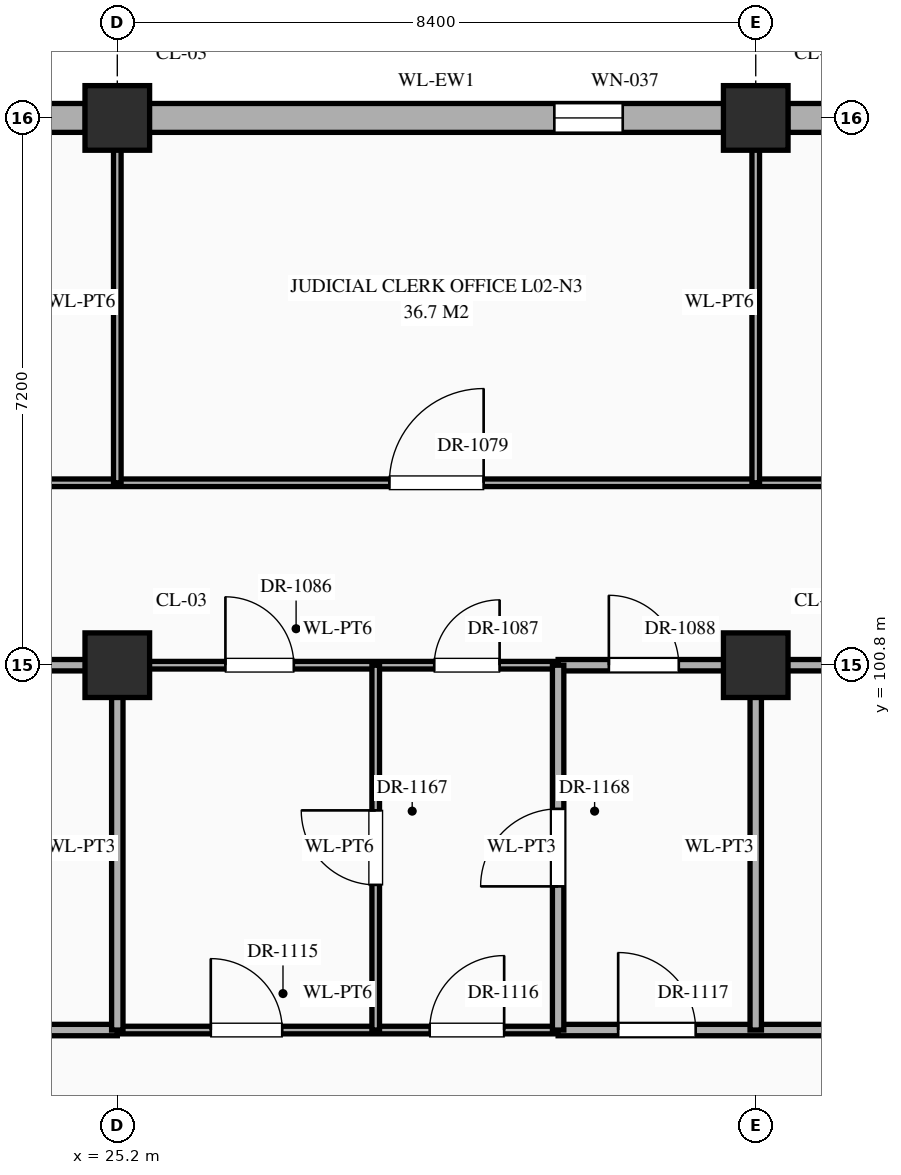
"""IFC4 building model, lengths in metres.
Left out: names, types, materials, properties, quantities, classifications, styles, units other than length and angle.
Written with IfcOpenShell. Run it as: python <this file> out.ifc"""

import sys

from ifc_helpers import new_model, si_unit, direction, frame, frame_2d, origin, origin_2d, place, context, subcontext, project, spatial, rectangle, extrude, element, fill, save


model = new_model("IFC4")
c1 = context("Model", 3, precision=1e-05, world=origin(), true_north=direction((0.0, 1.0)))
c2 = subcontext(c1, "Body", "Model", "MODEL_VIEW")
j1 = project(units=[si_unit("LENGTHUNIT", "METRE"), si_unit("PLANEANGLEUNIT", "RADIAN")], contexts=[c1])
p1 = place(None, origin())
s1 = spatial("IfcSite", under=j1, at=p1, CompositionType="ELEMENT")
p2 = place(p1, origin())
s2 = spatial("IfcBuilding", under=s1, at=p2, CompositionType="ELEMENT")
p3 = place(p2, frame((0.0, 0.0, 5.4)))
s3 = spatial("IfcBuildingStorey", under=s2, at=p3, CompositionType="ELEMENT", Elevation=5.4)
for number, where, z_axis, x_axis in (
    (1, (25.2, 100.8, 0.0), (0.0, 0.0, 1.0), (1.0, 0.0, 0.0)),
    (2, (25.2, 108.0, 0.0), (0.0, 0.0, 1.0), (1.0, 0.0, 0.0)),
    (3, (33.6, 100.8, 0.0), (0.0, 0.0, 1.0), (1.0, 0.0, 0.0)),
    (4, (33.6, 108.0, 0.0), (0.0, 0.0, 1.0), (1.0, 0.0, 0.0)),
):
    element("IfcColumn", number, at=place(p3, frame(where, z_axis=z_axis, x_axis=x_axis)), inside=s3, PredefinedType="COLUMN", context=c2, shape_type="SweptSolid", body=[
        extrude(rectangle(XDim=0.85, YDim=0.85, at=origin_2d()), origin(), (0.0, 0.0, 1.0), 5.4),
    ])
p4 = place(p3, frame((17.22, 108.0, 0.0), z_axis=(0.0, 0.0, 1.0), x_axis=(1.0, 0.0, 0.0)))
e5 = element("IfcWall", 5, at=p4, inside=s3, PredefinedType="STANDARD", context=c2, shape_type="SweptSolid", body=[
    extrude(rectangle(XDim=7.56, YDim=0.38, at=frame_2d((3.78, 0.0))), origin(), (0.0, 0.0, 1.0), 4.47),
])
p5 = place(p4, frame((5.33, 0.0, 0.85)))
e6 = element("IfcOpeningElement", 6, at=p5, cuts=e5, PredefinedType="OPENING", context=c2, shape_type="SweptSolid", body=[
    extrude(rectangle(XDim=0.9, YDim=1.2, at=frame_2d((0.45, 0.6))), frame((0.0, 0.202, 0.0), z_axis=(0.0, -1.0, 0.0), x_axis=(1.0, 0.0, 0.0)), (0.0, 0.0, 1.0), 0.404),
])
p6 = place(p3, frame((25.62, 108.0, 0.0), z_axis=(0.0, 0.0, 1.0), x_axis=(1.0, 0.0, 0.0)))
e7 = element("IfcWall", 7, at=p6, inside=s3, PredefinedType="STANDARD", context=c2, shape_type="SweptSolid", body=[
    extrude(rectangle(XDim=7.56, YDim=0.38, at=frame_2d((3.78, 0.0))), origin(), (0.0, 0.0, 1.0), 4.47),
])
p7 = place(p6, frame((5.33, 0.0, 0.85)))
e8 = element("IfcOpeningElement", 8, at=p7, cuts=e7, PredefinedType="OPENING", context=c2, shape_type="SweptSolid", body=[
    extrude(rectangle(XDim=0.9, YDim=1.38, at=frame_2d((0.45, 0.69))), frame((0.0, 0.202, 0.0), z_axis=(0.0, -1.0, 0.0), x_axis=(1.0, 0.0, 0.0)), (0.0, 0.0, 1.0), 0.404),
])
p8 = place(p3, frame((34.02, 108.0, 0.0), z_axis=(0.0, 0.0, 1.0), x_axis=(1.0, 0.0, 0.0)))
e9 = element("IfcWall", 9, at=p8, inside=s3, PredefinedType="STANDARD", context=c2, shape_type="SweptSolid", body=[
    extrude(rectangle(XDim=7.56, YDim=0.38, at=frame_2d((3.78, 0.0))), origin(), (0.0, 0.0, 1.0), 4.47),
])
p9 = place(p8, frame((5.33, 0.0, 0.85)))
e10 = element("IfcOpeningElement", 10, at=p9, cuts=e9, PredefinedType="OPENING", context=c2, shape_type="SweptSolid", body=[
    extrude(rectangle(XDim=0.9, YDim=1.56, at=frame_2d((0.45, 0.78))), frame((0.0, 0.202, 0.0), z_axis=(0.0, -1.0, 0.0), x_axis=(1.0, 0.0, 0.0)), (0.0, 0.0, 1.0), 0.404),
])
p10 = place(p3, frame((5.8, 96.0, 0.0), z_axis=(0.0, 0.0, 1.0), x_axis=(1.0, 0.0, 0.0)))
e11 = element("IfcWall", 11, at=p10, inside=s3, PredefinedType="STANDARD", context=c2, shape_type="SweptSolid", body=[
    extrude(rectangle(XDim=19.4, YDim=0.15, at=frame_2d((9.7, 0.0))), origin(), (0.0, 0.0, 1.0), 5.12),
])
p11 = place(p10, frame((0.7, 0.0, 0.0)))
e12 = element("IfcOpeningElement", 12, at=p11, cuts=e11, PredefinedType="OPENING", context=c2, shape_type="SweptSolid", body=[
    extrude(rectangle(XDim=1.2, YDim=2.35, at=frame_2d((0.6, 1.175))), frame((0.0, 0.087, 0.0), z_axis=(0.0, -1.0, 0.0), x_axis=(1.0, 0.0, 0.0)), (0.0, 0.0, 1.0), 0.174),
])
p12 = place(p10, frame((6.18, 0.0, 0.0)))
e13 = element("IfcOpeningElement", 13, at=p12, cuts=e11, PredefinedType="OPENING", context=c2, shape_type="SweptSolid", body=[
    extrude(rectangle(XDim=1.24, YDim=2.3, at=frame_2d((0.62, 1.15))), frame((0.0, 0.087, 0.0), z_axis=(0.0, -1.0, 0.0), x_axis=(1.0, 0.0, 0.0)), (0.0, 0.0, 1.0), 0.174),
])
p13 = place(p10, frame((14.56, 0.0, 0.0)))
e14 = element("IfcOpeningElement", 14, at=p13, cuts=e11, PredefinedType="OPENING", context=c2, shape_type="SweptSolid", body=[
    extrude(rectangle(XDim=1.28, YDim=2.35, at=frame_2d((0.64, 1.175))), frame((0.0, 0.087, 0.0), z_axis=(0.0, -1.0, 0.0), x_axis=(1.0, 0.0, 0.0)), (0.0, 0.0, 1.0), 0.174),
])
p14 = place(p3, frame((25.2, 96.0, 0.0), z_axis=(0.0, 0.0, 1.0), x_axis=(1.0, 0.0, 0.0)))
e15 = element("IfcWall", 15, at=p14, inside=s3, PredefinedType="STANDARD", context=c2, shape_type="SweptSolid", body=[
    extrude(rectangle(XDim=5.8, YDim=0.1, at=frame_2d((2.9, 0.0))), origin(), (0.0, 0.0, 1.0), 5.12),
])
p15 = place(p14, frame((1.23, 0.0, 0.0)))
e16 = element("IfcOpeningElement", 16, at=p15, cuts=e15, PredefinedType="OPENING", context=c2, shape_type="SweptSolid", body=[
    extrude(rectangle(XDim=0.94, YDim=2.3, at=frame_2d((0.47, 1.15))), frame((0.0, 0.062, 0.0), z_axis=(0.0, -1.0, 0.0), x_axis=(1.0, 0.0, 0.0)), (0.0, 0.0, 1.0), 0.124),
])
p16 = place(p14, frame((4.11, 0.0, 0.0)))
e17 = element("IfcOpeningElement", 17, at=p16, cuts=e15, PredefinedType="OPENING", context=c2, shape_type="SweptSolid", body=[
    extrude(rectangle(XDim=0.98, YDim=2.35, at=frame_2d((0.49, 1.175))), frame((0.0, 0.062, 0.0), z_axis=(0.0, -1.0, 0.0), x_axis=(1.0, 0.0, 0.0)), (0.0, 0.0, 1.0), 0.124),
])
p17 = place(p3, frame((31.0, 96.0, 0.0), z_axis=(0.0, 0.0, 1.0), x_axis=(1.0, 0.0, 0.0)))
e18 = element("IfcWall", 18, at=p17, inside=s3, PredefinedType="STANDARD", context=c2, shape_type="SweptSolid", body=[
    extrude(rectangle(XDim=19.4, YDim=0.15, at=frame_2d((9.7, 0.0))), origin(), (0.0, 0.0, 1.0), 5.12),
])
p18 = place(p17, frame((0.79, 0.0, 0.0)))
e19 = element("IfcOpeningElement", 19, at=p18, cuts=e18, PredefinedType="OPENING", context=c2, shape_type="SweptSolid", body=[
    extrude(rectangle(XDim=1.02, YDim=2.4, at=frame_2d((0.51, 1.2))), frame((0.0, 0.087, 0.0), z_axis=(0.0, -1.0, 0.0), x_axis=(1.0, 0.0, 0.0)), (0.0, 0.0, 1.0), 0.174),
])
p19 = place(p17, frame((6.27, 0.0, 0.0)))
e20 = element("IfcOpeningElement", 20, at=p19, cuts=e18, PredefinedType="OPENING", context=c2, shape_type="SweptSolid", body=[
    extrude(rectangle(XDim=1.06, YDim=2.4, at=frame_2d((0.53, 1.2))), frame((0.0, 0.087, 0.0), z_axis=(0.0, -1.0, 0.0), x_axis=(1.0, 0.0, 0.0)), (0.0, 0.0, 1.0), 0.174),
])
p20 = place(p17, frame((14.63, 0.0, 0.0)))
e21 = element("IfcOpeningElement", 21, at=p20, cuts=e18, PredefinedType="OPENING", context=c2, shape_type="SweptSolid", body=[
    extrude(rectangle(XDim=1.14, YDim=2.4, at=frame_2d((0.57, 1.2))), frame((0.0, 0.087, 0.0), z_axis=(0.0, -1.0, 0.0), x_axis=(1.0, 0.0, 0.0)), (0.0, 0.0, 1.0), 0.174),
])
p21 = place(p3, frame((5.8, 100.8, 0.0), z_axis=(0.0, 0.0, 1.0), x_axis=(1.0, 0.0, 0.0)))
e22 = element("IfcWall", 22, at=p21, inside=s3, PredefinedType="STANDARD", context=c2, shape_type="SweptSolid", body=[
    extrude(rectangle(XDim=19.4, YDim=0.15, at=frame_2d((9.7, 0.0))), origin(), (0.0, 0.0, 1.0), 4.27),
])
p22 = place(p21, frame((0.617, 0.0, 0.0)))
e23 = element("IfcOpeningElement", 23, at=p22, cuts=e22, PredefinedType="OPENING", context=c2, shape_type="SweptSolid", body=[
    extrude(rectangle(XDim=1.02, YDim=2.4, at=frame_2d((0.51, 1.2))), frame((0.0, 0.087, 0.0), z_axis=(0.0, -1.0, 0.0), x_axis=(1.0, 0.0, 0.0)), (0.0, 0.0, 1.0), 0.174),
])
p23 = place(p21, frame((6.27, 0.0, 0.0)))
e24 = element("IfcOpeningElement", 24, at=p23, cuts=e22, PredefinedType="OPENING", context=c2, shape_type="SweptSolid", body=[
    extrude(rectangle(XDim=1.06, YDim=2.4, at=frame_2d((0.53, 1.2))), frame((0.0, 0.087, 0.0), z_axis=(0.0, -1.0, 0.0), x_axis=(1.0, 0.0, 0.0)), (0.0, 0.0, 1.0), 0.174),
])
p24 = place(p21, frame((14.63, 0.0, 0.0)))
e25 = element("IfcOpeningElement", 25, at=p24, cuts=e22, PredefinedType="OPENING", context=c2, shape_type="SweptSolid", body=[
    extrude(rectangle(XDim=1.14, YDim=2.4, at=frame_2d((0.57, 1.2))), frame((0.0, 0.087, 0.0), z_axis=(0.0, -1.0, 0.0), x_axis=(1.0, 0.0, 0.0)), (0.0, 0.0, 1.0), 0.174),
])
p25 = place(p3, frame((25.2, 100.8, 0.0), z_axis=(0.0, 0.0, 1.0), x_axis=(1.0, 0.0, 0.0)))
e26 = element("IfcWall", 26, at=p25, inside=s3, PredefinedType="STANDARD", context=c2, shape_type="SweptSolid", body=[
    extrude(rectangle(XDim=5.8, YDim=0.1, at=frame_2d((2.9, 0.0))), origin(), (0.0, 0.0, 1.0), 4.27),
])
p26 = place(p25, frame((1.423, 0.0, 0.0)))
e27 = element("IfcOpeningElement", 27, at=p26, cuts=e26, PredefinedType="OPENING", context=c2, shape_type="SweptSolid", body=[
    extrude(rectangle(XDim=0.9, YDim=2.15, at=frame_2d((0.45, 1.075))), frame((0.0, 0.062, 0.0), z_axis=(0.0, -1.0, 0.0), x_axis=(1.0, 0.0, 0.0)), (0.0, 0.0, 1.0), 0.124),
])
p27 = place(p25, frame((4.17, 0.0, 0.0)))
e28 = element("IfcOpeningElement", 28, at=p27, cuts=e26, PredefinedType="OPENING", context=c2, shape_type="SweptSolid", body=[
    extrude(rectangle(XDim=0.86, YDim=2.1, at=frame_2d((0.43, 1.05))), frame((0.0, 0.062, 0.0), z_axis=(0.0, -1.0, 0.0), x_axis=(1.0, 0.0, 0.0)), (0.0, 0.0, 1.0), 0.124),
])
p28 = place(p3, frame((31.0, 100.8, 0.0), z_axis=(0.0, 0.0, 1.0), x_axis=(1.0, 0.0, 0.0)))
e29 = element("IfcWall", 29, at=p28, inside=s3, PredefinedType="STANDARD", context=c2, shape_type="SweptSolid", body=[
    extrude(rectangle(XDim=11.0, YDim=0.15, at=frame_2d((5.5, 0.0))), origin(), (0.0, 0.0, 1.0), 4.27),
])
p29 = place(p28, frame((0.667, 0.0, 0.0)))
e30 = element("IfcOpeningElement", 30, at=p29, cuts=e29, PredefinedType="OPENING", context=c2, shape_type="SweptSolid", body=[
    extrude(rectangle(XDim=0.92, YDim=2.15, at=frame_2d((0.46, 1.075))), frame((0.0, 0.087, 0.0), z_axis=(0.0, -1.0, 0.0), x_axis=(1.0, 0.0, 0.0)), (0.0, 0.0, 1.0), 0.174),
])
p30 = place(p28, frame((6.32, 0.0, 0.0)))
e31 = element("IfcOpeningElement", 31, at=p30, cuts=e29, PredefinedType="OPENING", context=c2, shape_type="SweptSolid", body=[
    extrude(rectangle(XDim=0.96, YDim=2.2, at=frame_2d((0.48, 1.1))), frame((0.0, 0.087, 0.0), z_axis=(0.0, -1.0, 0.0), x_axis=(1.0, 0.0, 0.0)), (0.0, 0.0, 1.0), 0.174),
])
p31 = place(p3, frame((0.04, 103.2, 0.0), z_axis=(0.0, 0.0, 1.0), x_axis=(1.0, 0.0, 0.0)))
e32 = element("IfcWall", 32, at=p31, inside=s3, PredefinedType="STANDARD", context=c2, shape_type="SweptSolid", body=[
    extrude(rectangle(XDim=41.96, YDim=0.1, at=frame_2d((20.98, 0.0))), origin(), (0.0, 0.0, 1.0), 5.12),
])
p32 = place(p31, frame((3.62, 0.0, 0.0)))
e33 = element("IfcOpeningElement", 33, at=p32, cuts=e32, PredefinedType="OPENING", context=c2, shape_type="SweptSolid", body=[
    extrude(rectangle(XDim=1.12, YDim=2.25, at=frame_2d((0.56, 1.125))), frame((0.0, 0.062, 0.0), z_axis=(0.0, -1.0, 0.0), x_axis=(1.0, 0.0, 0.0)), (0.0, 0.0, 1.0), 0.124),
])
p33 = place(p31, frame((11.98, 0.0, 0.0)))
e34 = element("IfcOpeningElement", 34, at=p33, cuts=e32, PredefinedType="OPENING", context=c2, shape_type="SweptSolid", body=[
    extrude(rectangle(XDim=1.16, YDim=2.3, at=frame_2d((0.58, 1.15))), frame((0.0, 0.062, 0.0), z_axis=(0.0, -1.0, 0.0), x_axis=(1.0, 0.0, 0.0)), (0.0, 0.0, 1.0), 0.124),
])
p34 = place(p31, frame((20.36, 0.0, 0.0)))
e35 = element("IfcOpeningElement", 35, at=p34, cuts=e32, PredefinedType="OPENING", context=c2, shape_type="SweptSolid", body=[
    extrude(rectangle(XDim=1.2, YDim=2.35, at=frame_2d((0.6, 1.175))), frame((0.0, 0.062, 0.0), z_axis=(0.0, -1.0, 0.0), x_axis=(1.0, 0.0, 0.0)), (0.0, 0.0, 1.0), 0.124),
])
p35 = place(p31, frame((28.74, 0.0, 0.0)))
e36 = element("IfcOpeningElement", 36, at=p35, cuts=e32, PredefinedType="OPENING", context=c2, shape_type="SweptSolid", body=[
    extrude(rectangle(XDim=1.24, YDim=2.3, at=frame_2d((0.62, 1.15))), frame((0.0, 0.062, 0.0), z_axis=(0.0, -1.0, 0.0), x_axis=(1.0, 0.0, 0.0)), (0.0, 0.0, 1.0), 0.124),
])
p36 = place(p31, frame((37.12, 0.0, 0.0)))
e37 = element("IfcOpeningElement", 37, at=p36, cuts=e32, PredefinedType="OPENING", context=c2, shape_type="SweptSolid", body=[
    extrude(rectangle(XDim=1.28, YDim=2.35, at=frame_2d((0.64, 1.175))), frame((0.0, 0.062, 0.0), z_axis=(0.0, -1.0, 0.0), x_axis=(1.0, 0.0, 0.0)), (0.0, 0.0, 1.0), 0.124),
])
p37 = place(p3, frame((25.2, 96.0, 0.0), z_axis=(0.0, 0.0, 1.0), x_axis=(0.0, 1.0, 0.0)))
e38 = element("IfcWall", 38, at=p37, inside=s3, PredefinedType="STANDARD", context=c2, shape_type="SweptSolid", body=[
    extrude(rectangle(XDim=4.8, YDim=0.15, at=frame_2d((2.4, 0.0))), origin(), (0.0, 0.0, 1.0), 4.37),
])
p38 = place(p3, frame((25.2, 103.2, 0.0), z_axis=(0.0, 0.0, 1.0), x_axis=(0.0, 1.0, 0.0)))
e39 = element("IfcWall", 39, at=p38, inside=s3, PredefinedType="STANDARD", context=c2, shape_type="SweptSolid", body=[
    extrude(rectangle(XDim=4.76, YDim=0.1, at=frame_2d((2.38, 0.0))), origin(), (0.0, 0.0, 1.0), 4.37),
])
p39 = place(p3, frame((28.6, 96.0, 0.0), z_axis=(0.0, 0.0, 1.0), x_axis=(0.0, 1.0, 0.0)))
e40 = element("IfcWall", 40, at=p39, inside=s3, PredefinedType="STANDARD", context=c2, shape_type="SweptSolid", body=[
    extrude(rectangle(XDim=4.8, YDim=0.1, at=frame_2d((2.4, 0.0))), origin(), (0.0, 0.0, 1.0), 5.12),
])
p40 = place(p39, frame((1.91, 0.0, 0.0)))
e41 = element("IfcOpeningElement", 41, at=p40, cuts=e40, PredefinedType="OPENING", context=c2, shape_type="SweptSolid", body=[
    extrude(rectangle(XDim=0.98, YDim=2.35, at=frame_2d((0.49, 1.175))), frame((0.0, 0.062, 0.0), z_axis=(0.0, -1.0, 0.0), x_axis=(1.0, 0.0, 0.0)), (0.0, 0.0, 1.0), 0.124),
])
p41 = place(p3, frame((31.0, 96.0, 0.0), z_axis=(0.0, 0.0, 1.0), x_axis=(0.0, 1.0, 0.0)))
e42 = element("IfcWall", 42, at=p41, inside=s3, PredefinedType="STANDARD", context=c2, shape_type="SweptSolid", body=[
    extrude(rectangle(XDim=4.8, YDim=0.15, at=frame_2d((2.4, 0.0))), origin(), (0.0, 0.0, 1.0), 5.12),
])
p42 = place(p41, frame((1.89, 0.0, 0.0)))
e43 = element("IfcOpeningElement", 43, at=p42, cuts=e42, PredefinedType="OPENING", context=c2, shape_type="SweptSolid", body=[
    extrude(rectangle(XDim=1.02, YDim=2.4, at=frame_2d((0.51, 1.2))), frame((0.0, 0.087, 0.0), z_axis=(0.0, -1.0, 0.0), x_axis=(1.0, 0.0, 0.0)), (0.0, 0.0, 1.0), 0.174),
])
p43 = place(p3, frame((33.6, 96.0, 0.0), z_axis=(0.0, 0.0, 1.0), x_axis=(0.0, 1.0, 0.0)))
e44 = element("IfcWall", 44, at=p43, inside=s3, PredefinedType="STANDARD", context=c2, shape_type="SweptSolid", body=[
    extrude(rectangle(XDim=4.8, YDim=0.15, at=frame_2d((2.4, 0.0))), origin(), (0.0, 0.0, 1.0), 4.37),
])
p44 = place(p3, frame((33.6, 103.2, 0.0), z_axis=(0.0, 0.0, 1.0), x_axis=(0.0, 1.0, 0.0)))
e45 = element("IfcWall", 45, at=p44, inside=s3, PredefinedType="STANDARD", context=c2, shape_type="SweptSolid", body=[
    extrude(rectangle(XDim=4.76, YDim=0.1, at=frame_2d((2.38, 0.0))), origin(), (0.0, 0.0, 1.0), 4.37),
])
p45 = place(p7, origin())
e46 = element("IfcWindow", 46, at=p45, inside=s3, PartitioningType="SINGLE_PANEL", PredefinedType="WINDOW", context=c2, shape_type="SweptSolid", body=[
    extrude(rectangle(XDim=0.9, YDim=1.38, at=frame_2d((0.45, 0.69))), frame((0.0, 0.03, 0.0), z_axis=(0.0, -1.0, 0.0), x_axis=(1.0, 0.0, 0.0)), (0.0, 0.0, 1.0), 0.06),
])
fill(e8, e46)
p46 = place(p35, origin())
e47 = element("IfcDoor", 47, at=p46, inside=s3, OperationType="SINGLE_SWING_RIGHT", PredefinedType="DOOR", context=c2, shape_type="SweptSolid", body=[
    extrude(rectangle(XDim=1.24, YDim=2.3, at=frame_2d((0.62, 1.15))), frame((0.0, 0.025, 0.0), z_axis=(0.0, -1.0, 0.0), x_axis=(1.0, 0.0, 0.0)), (0.0, 0.0, 1.0), 0.05),
])
fill(e36, e47)
p47 = place(p26, origin())
e48 = element("IfcDoor", 48, at=p47, inside=s3, OperationType="SINGLE_SWING_LEFT", PredefinedType="DOOR", context=c2, shape_type="SweptSolid", body=[
    extrude(rectangle(XDim=0.9, YDim=2.15, at=frame_2d((0.45, 1.075))), frame((0.0, 0.025, 0.0), z_axis=(0.0, -1.0, 0.0), x_axis=(1.0, 0.0, 0.0)), (0.0, 0.0, 1.0), 0.05),
])
fill(e27, e48)
p48 = place(p27, origin())
e49 = element("IfcDoor", 49, at=p48, inside=s3, OperationType="SINGLE_SWING_RIGHT", PredefinedType="DOOR", context=c2, shape_type="SweptSolid", body=[
    extrude(rectangle(XDim=0.86, YDim=2.1, at=frame_2d((0.43, 1.05))), frame((0.0, 0.025, 0.0), z_axis=(0.0, -1.0, 0.0), x_axis=(1.0, 0.0, 0.0)), (0.0, 0.0, 1.0), 0.05),
])
fill(e28, e49)
p49 = place(p29, origin())
e50 = element("IfcDoor", 50, at=p49, inside=s3, OperationType="SINGLE_SWING_LEFT", PredefinedType="DOOR", context=c2, shape_type="SweptSolid", body=[
    extrude(rectangle(XDim=0.92, YDim=2.15, at=frame_2d((0.46, 1.075))), frame((0.0, 0.025, 0.0), z_axis=(0.0, -1.0, 0.0), x_axis=(1.0, 0.0, 0.0)), (0.0, 0.0, 1.0), 0.05),
])
fill(e30, e50)
p50 = place(p15, origin())
e51 = element("IfcDoor", 51, at=p50, inside=s3, OperationType="SINGLE_SWING_LEFT", PredefinedType="DOOR", context=c2, shape_type="SweptSolid", body=[
    extrude(rectangle(XDim=0.94, YDim=2.3, at=frame_2d((0.47, 1.15))), frame((0.0, 0.025, 0.0), z_axis=(0.0, -1.0, 0.0), x_axis=(1.0, 0.0, 0.0)), (0.0, 0.0, 1.0), 0.05),
])
fill(e16, e51)
p51 = place(p16, origin())
e52 = element("IfcDoor", 52, at=p51, inside=s3, OperationType="SINGLE_SWING_RIGHT", PredefinedType="DOOR", context=c2, shape_type="SweptSolid", body=[
    extrude(rectangle(XDim=0.98, YDim=2.35, at=frame_2d((0.49, 1.175))), frame((0.0, 0.025, 0.0), z_axis=(0.0, -1.0, 0.0), x_axis=(1.0, 0.0, 0.0)), (0.0, 0.0, 1.0), 0.05),
])
fill(e17, e52)
p52 = place(p18, origin())
e53 = element("IfcDoor", 53, at=p52, inside=s3, OperationType="SINGLE_SWING_LEFT", PredefinedType="DOOR", context=c2, shape_type="SweptSolid", body=[
    extrude(rectangle(XDim=1.02, YDim=2.4, at=frame_2d((0.51, 1.2))), frame((0.0, 0.025, 0.0), z_axis=(0.0, -1.0, 0.0), x_axis=(1.0, 0.0, 0.0)), (0.0, 0.0, 1.0), 0.05),
])
fill(e19, e53)
p53 = place(p40, origin())
e54 = element("IfcDoor", 54, at=p53, inside=s3, OperationType="SINGLE_SWING_RIGHT", PredefinedType="DOOR", context=c2, shape_type="SweptSolid", body=[
    extrude(rectangle(XDim=0.98, YDim=2.35, at=frame_2d((0.49, 1.175))), frame((0.0, 0.025, 0.0), z_axis=(0.0, -1.0, 0.0), x_axis=(1.0, 0.0, 0.0)), (0.0, 0.0, 1.0), 0.05),
])
fill(e41, e54)
p54 = place(p42, origin())
e55 = element("IfcDoor", 55, at=p54, inside=s3, OperationType="SINGLE_SWING_LEFT", PredefinedType="DOOR", context=c2, shape_type="SweptSolid", body=[
    extrude(rectangle(XDim=1.02, YDim=2.4, at=frame_2d((0.51, 1.2))), frame((0.0, 0.025, 0.0), z_axis=(0.0, -1.0, 0.0), x_axis=(1.0, 0.0, 0.0)), (0.0, 0.0, 1.0), 0.05),
])
fill(e43, e55)
save(model, sys.argv[1])
